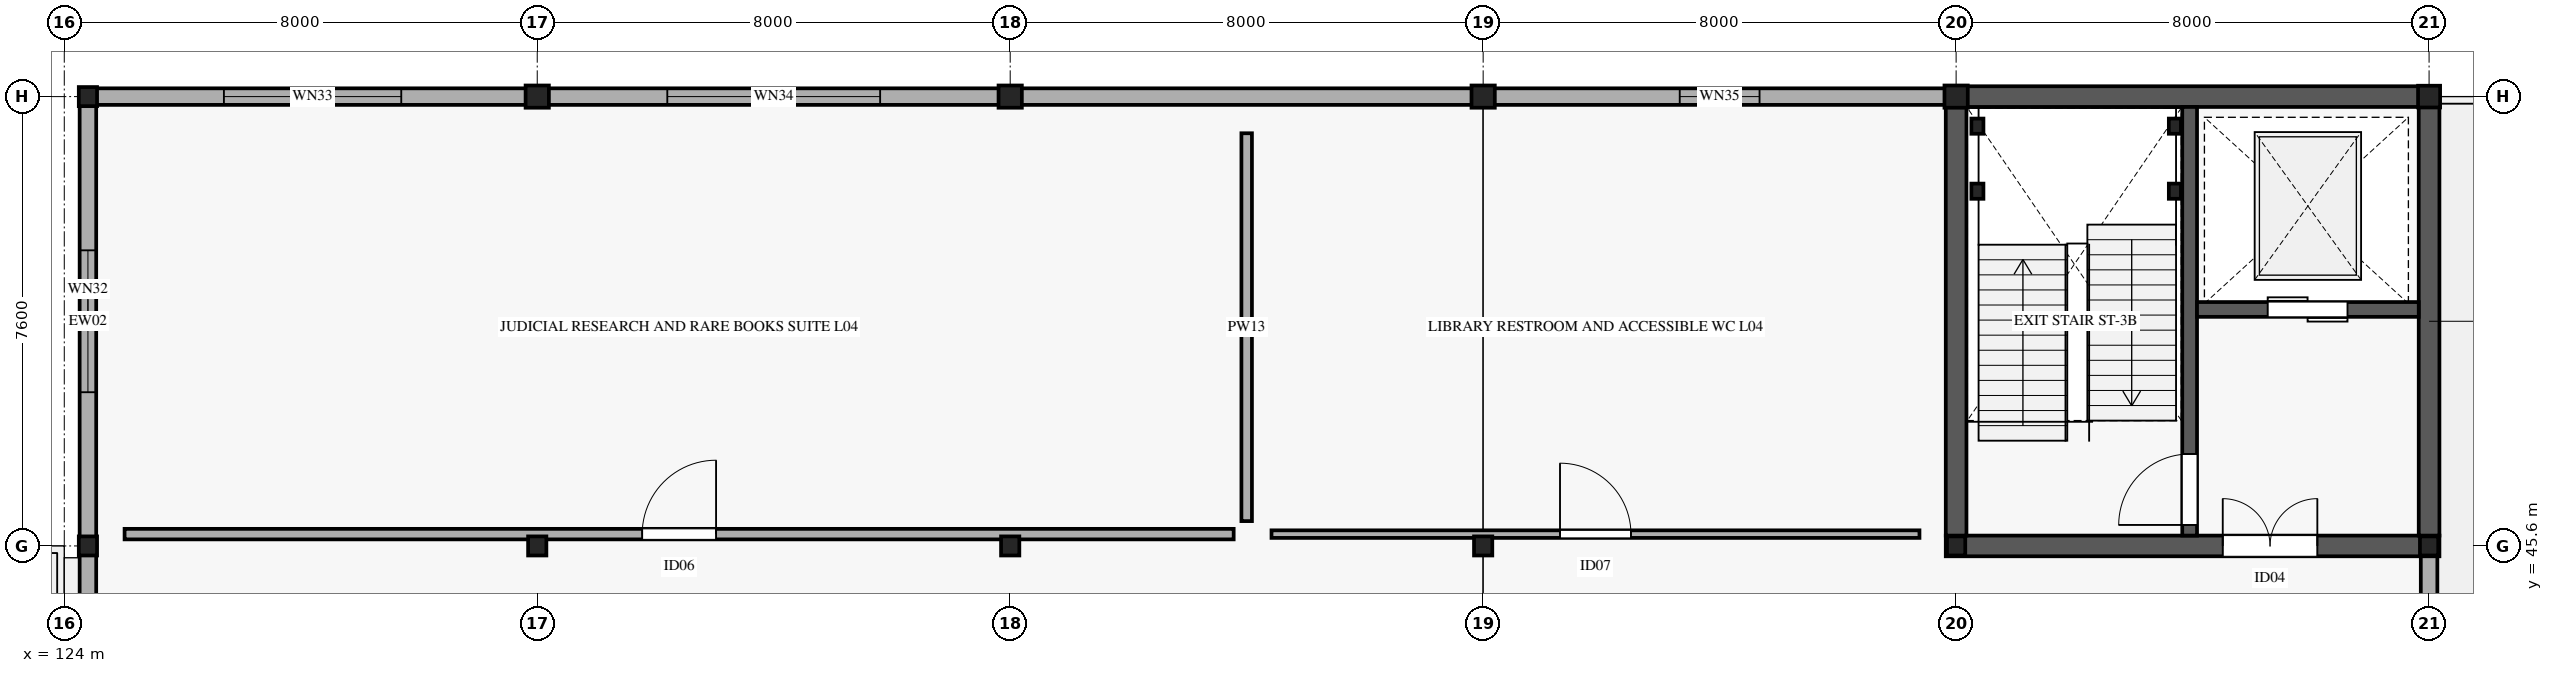
"""IFC4 building model, lengths in metres.
Left out: names, types, materials, properties, quantities, classifications, styles, units other than length and angle.
Written with IfcOpenShell. Run it as: python <this file> out.ifc"""

import sys

from ifc_helpers import new_model, si_unit, direction, frame, frame_2d, origin, origin_2d, place, context, subcontext, project, spatial, rectangle, i_section, extrude, element, fill, save


model = new_model("IFC4")
c1 = context("Model", 3, precision=1e-05, world=origin(), true_north=direction((0.0, 1.0)))
c2 = subcontext(c1, "Body", "Model", "MODEL_VIEW")
j1 = project(units=[si_unit("LENGTHUNIT", "METRE"), si_unit("PLANEANGLEUNIT", "RADIAN")], contexts=[c1])
p1 = place(None, origin())
s1 = spatial("IfcSite", under=j1, at=p1, CompositionType="ELEMENT")
p2 = place(p1, origin())
s2 = spatial("IfcBuilding", under=s1, at=p2, CompositionType="ELEMENT")
p3 = place(p2, frame((0.0, 0.0, 20.4)))
s3 = spatial("IfcBuildingStorey", under=s2, at=p3, CompositionType="ELEMENT", Elevation=20.4)
for number, where, z_axis, x_axis in (
    (1, (124.4, 45.6, 0.0), (0.0, 0.0, 1.0), (1.0, 0.0, 0.0)),
    (2, (124.4, 53.2, 0.0), (0.0, 0.0, 1.0), (1.0, 0.0, 0.0)),
    (3, (132.0, 45.6, 0.0), (0.0, 0.0, 1.0), (1.0, 0.0, 0.0)),
):
    element("IfcColumn", number, at=place(p3, frame(where, z_axis=z_axis, x_axis=x_axis)), inside=s3, PredefinedType="COLUMN", context=c2, shape_type="SweptSolid", body=[
        extrude(i_section(OverallWidth=0.309, OverallDepth=0.323, WebThickness=0.014, FlangeThickness=0.023, FilletRadius=0.015, at=origin_2d()), origin(), (0.0, 0.0, 1.0), 4.545),
    ])
p4 = place(p3, frame((132.0, 53.2, 0.0), z_axis=(0.0, 0.0, 1.0), x_axis=(1.0, 0.0, 0.0)))
e4 = element("IfcColumn", 4, at=p4, inside=s3, PredefinedType="COLUMN", context=c2, shape_type="SweptSolid", body=[
    extrude(i_section(OverallWidth=0.394, OverallDepth=0.376, WebThickness=0.017, FlangeThickness=0.028, FilletRadius=0.015, at=origin_2d()), origin(), (0.0, 0.0, 1.0), 4.545),
])
p5 = place(p3, frame((140.0, 45.6, 0.0), z_axis=(0.0, 0.0, 1.0), x_axis=(1.0, 0.0, 0.0)))
e5 = element("IfcColumn", 5, at=p5, inside=s3, PredefinedType="COLUMN", context=c2, shape_type="SweptSolid", body=[
    extrude(i_section(OverallWidth=0.309, OverallDepth=0.323, WebThickness=0.014, FlangeThickness=0.023, FilletRadius=0.015, at=origin_2d()), origin(), (0.0, 0.0, 1.0), 4.545),
])
p6 = place(p3, frame((140.0, 53.2, 0.0), z_axis=(0.0, 0.0, 1.0), x_axis=(1.0, 0.0, 0.0)))
e6 = element("IfcColumn", 6, at=p6, inside=s3, PredefinedType="COLUMN", context=c2, shape_type="SweptSolid", body=[
    extrude(i_section(OverallWidth=0.394, OverallDepth=0.376, WebThickness=0.017, FlangeThickness=0.028, FilletRadius=0.015, at=origin_2d()), origin(), (0.0, 0.0, 1.0), 4.545),
])
p7 = place(p3, frame((148.0, 45.6, 0.0), z_axis=(0.0, 0.0, 1.0), x_axis=(1.0, 0.0, 0.0)))
e7 = element("IfcColumn", 7, at=p7, inside=s3, PredefinedType="COLUMN", context=c2, shape_type="SweptSolid", body=[
    extrude(i_section(OverallWidth=0.309, OverallDepth=0.323, WebThickness=0.014, FlangeThickness=0.023, FilletRadius=0.015, at=origin_2d()), origin(), (0.0, 0.0, 1.0), 4.545),
])
p8 = place(p3, frame((148.0, 53.2, 0.0), z_axis=(0.0, 0.0, 1.0), x_axis=(1.0, 0.0, 0.0)))
e8 = element("IfcColumn", 8, at=p8, inside=s3, PredefinedType="COLUMN", context=c2, shape_type="SweptSolid", body=[
    extrude(i_section(OverallWidth=0.394, OverallDepth=0.376, WebThickness=0.017, FlangeThickness=0.028, FilletRadius=0.015, at=origin_2d()), origin(), (0.0, 0.0, 1.0), 4.545),
])
p9 = place(p3, frame((156.0, 45.6, 0.0), z_axis=(0.0, 0.0, 1.0), x_axis=(1.0, 0.0, 0.0)))
e9 = element("IfcColumn", 9, at=p9, inside=s3, PredefinedType="COLUMN", context=c2, shape_type="SweptSolid", body=[
    extrude(i_section(OverallWidth=0.309, OverallDepth=0.323, WebThickness=0.014, FlangeThickness=0.023, FilletRadius=0.015, at=origin_2d()), origin(), (0.0, 0.0, 1.0), 4.545),
])
p10 = place(p3, frame((156.0, 53.2, 0.0), z_axis=(0.0, 0.0, 1.0), x_axis=(1.0, 0.0, 0.0)))
e10 = element("IfcColumn", 10, at=p10, inside=s3, PredefinedType="COLUMN", context=c2, shape_type="SweptSolid", body=[
    extrude(i_section(OverallWidth=0.394, OverallDepth=0.376, WebThickness=0.017, FlangeThickness=0.028, FilletRadius=0.015, at=origin_2d()), origin(), (0.0, 0.0, 1.0), 4.545),
])
p11 = place(p3, frame((164.0, 45.6, 0.0), z_axis=(0.0, 0.0, 1.0), x_axis=(1.0, 0.0, 0.0)))
e11 = element("IfcColumn", 11, at=p11, inside=s3, PredefinedType="COLUMN", context=c2, shape_type="SweptSolid", body=[
    extrude(i_section(OverallWidth=0.309, OverallDepth=0.323, WebThickness=0.014, FlangeThickness=0.023, FilletRadius=0.015, at=origin_2d()), origin(), (0.0, 0.0, 1.0), 4.545),
])
p12 = place(p3, frame((164.0, 53.2, 0.0), z_axis=(0.0, 0.0, 1.0), x_axis=(1.0, 0.0, 0.0)))
e12 = element("IfcColumn", 12, at=p12, inside=s3, PredefinedType="COLUMN", context=c2, shape_type="SweptSolid", body=[
    extrude(i_section(OverallWidth=0.373, OverallDepth=0.368, WebThickness=0.015, FlangeThickness=0.024, FilletRadius=0.015, at=origin_2d()), origin(), (0.0, 0.0, 1.0), 4.545),
])
p13 = place(p3, frame((124.4, 37.98, 0.0), z_axis=(0.0, 0.0, 1.0), x_axis=(0.0, 1.0, 0.0)))
e13 = element("IfcWall", 13, at=p13, inside=s3, PredefinedType="STANDARD", context=c2, shape_type="SweptSolid", body=[
    extrude(rectangle(XDim=7.64, YDim=0.28, at=frame_2d((3.82, 0.0))), origin(), (0.0, 0.0, 1.0), 3.605),
])
p14 = place(p13, frame((3.12, 0.0, 0.0)))
e14 = element("IfcOpeningElement", 14, at=p14, cuts=e13, PredefinedType="OPENING", context=c2, shape_type="SweptSolid", body=[
    extrude(rectangle(XDim=1.4, YDim=2.2, at=frame_2d((0.7, 1.1))), frame((0.0, 0.15, 0.0), z_axis=(0.0, -1.0, 0.0), x_axis=(1.0, 0.0, 0.0)), (0.0, 0.0, 1.0), 0.3),
])
p15 = place(p3, frame((124.4, 45.58, 0.0), z_axis=(0.0, 0.0, 1.0), x_axis=(0.0, 1.0, 0.0)))
e15 = element("IfcWall", 15, at=p15, inside=s3, PredefinedType="STANDARD", context=c2, shape_type="SweptSolid", body=[
    extrude(rectangle(XDim=7.64, YDim=0.28, at=frame_2d((3.82, 0.0))), origin(), (0.0, 0.0, 1.0), 3.605),
])
p16 = place(p15, frame((2.62, 0.0, 0.75)))
e16 = element("IfcOpeningElement", 16, at=p16, cuts=e15, PredefinedType="OPENING", context=c2, shape_type="SweptSolid", body=[
    extrude(rectangle(XDim=2.4, YDim=1.3, at=frame_2d((1.2, 0.65))), frame((0.0, 0.15, 0.0), z_axis=(0.0, -1.0, 0.0), x_axis=(1.0, 0.0, 0.0)), (0.0, 0.0, 1.0), 0.3),
])
p17 = place(p3, frame((124.38, 53.2, 0.0), z_axis=(0.0, 0.0, 1.0), x_axis=(1.0, 0.0, 0.0)))
e17 = element("IfcWall", 17, at=p17, inside=s3, PredefinedType="STANDARD", context=c2, shape_type="SweptSolid", body=[
    extrude(rectangle(XDim=7.64, YDim=0.28, at=frame_2d((3.82, 0.0))), origin(), (0.0, 0.0, 1.0), 3.605),
])
p18 = place(p17, frame((2.32, 0.0, 0.75)))
e18 = element("IfcOpeningElement", 18, at=p18, cuts=e17, PredefinedType="OPENING", context=c2, shape_type="SweptSolid", body=[
    extrude(rectangle(XDim=3.0, YDim=1.3, at=frame_2d((1.5, 0.65))), frame((0.0, 0.15, 0.0), z_axis=(0.0, -1.0, 0.0), x_axis=(1.0, 0.0, 0.0)), (0.0, 0.0, 1.0), 0.3),
])
p19 = place(p3, frame((131.98, 53.2, 0.0), z_axis=(0.0, 0.0, 1.0), x_axis=(1.0, 0.0, 0.0)))
e19 = element("IfcWall", 19, at=p19, inside=s3, PredefinedType="STANDARD", context=c2, shape_type="SweptSolid", body=[
    extrude(rectangle(XDim=8.04, YDim=0.28, at=frame_2d((4.02, 0.0))), origin(), (0.0, 0.0, 1.0), 3.605),
])
p20 = place(p19, frame((2.22, 0.0, 0.75)))
e20 = element("IfcOpeningElement", 20, at=p20, cuts=e19, PredefinedType="OPENING", context=c2, shape_type="SweptSolid", body=[
    extrude(rectangle(XDim=3.6, YDim=1.3, at=frame_2d((1.8, 0.65))), frame((0.0, 0.15, 0.0), z_axis=(0.0, -1.0, 0.0), x_axis=(1.0, 0.0, 0.0)), (0.0, 0.0, 1.0), 0.3),
])
p21 = place(p3, frame((139.98, 53.2, 0.0), z_axis=(0.0, 0.0, 1.0), x_axis=(1.0, 0.0, 0.0)))
e21 = element("IfcWall", 21, at=p21, inside=s3, PredefinedType="STANDARD", context=c2, shape_type="SweptSolid", body=[
    extrude(rectangle(XDim=8.04, YDim=0.28, at=frame_2d((4.02, 0.0))), origin(), (0.0, 0.0, 1.0), 3.605),
])
p22 = place(p3, frame((147.98, 53.2, 0.0), z_axis=(0.0, 0.0, 1.0), x_axis=(1.0, 0.0, 0.0)))
e22 = element("IfcWall", 22, at=p22, inside=s3, PredefinedType="STANDARD", context=c2, shape_type="SweptSolid", body=[
    extrude(rectangle(XDim=8.04, YDim=0.28, at=frame_2d((4.02, 0.0))), origin(), (0.0, 0.0, 1.0), 3.605),
])
p23 = place(p22, frame((3.345, 0.0, 0.75)))
e23 = element("IfcOpeningElement", 23, at=p23, cuts=e22, PredefinedType="OPENING", context=c2, shape_type="SweptSolid", body=[
    extrude(rectangle(XDim=1.35, YDim=1.9, at=frame_2d((0.675, 0.95))), frame((0.0, 0.15, 0.0), z_axis=(0.0, -1.0, 0.0), x_axis=(1.0, 0.0, 0.0)), (0.0, 0.0, 1.0), 0.3),
])
p24 = place(p3, frame((164.0, 45.62, 0.0), z_axis=(0.0, 0.0, 1.0), x_axis=(0.0, -1.0, 0.0)))
e24 = element("IfcWall", 24, at=p24, inside=s3, PredefinedType="STANDARD", context=c2, shape_type="SweptSolid", body=[
    extrude(rectangle(XDim=7.64, YDim=0.28, at=frame_2d((3.82, 0.0))), origin(), (0.0, 0.0, 1.0), 3.605),
])
p25 = place(p24, frame((3.045, 0.0, 0.0)))
e25 = element("IfcOpeningElement", 25, at=p25, cuts=e24, PredefinedType="OPENING", context=c2, shape_type="SweptSolid", body=[
    extrude(rectangle(XDim=1.55, YDim=2.25, at=frame_2d((0.775, 1.125))), frame((0.0, 0.15, 0.0), z_axis=(0.0, -1.0, 0.0), x_axis=(1.0, 0.0, 0.0)), (0.0, 0.0, 1.0), 0.3),
])
p26 = place(p3, frame((155.825, 45.6, 0.0), z_axis=(0.0, 0.0, 1.0), x_axis=(1.0, 0.0, 0.0)))
e26 = element("IfcWall", 26, at=p26, inside=s3, PredefinedType="SHEAR", context=c2, shape_type="SweptSolid", body=[
    extrude(rectangle(XDim=8.35, YDim=0.35, at=frame_2d((4.175, 0.0))), origin(), (0.0, 0.0, 1.0), 4.545),
])
p27 = place(p26, frame((4.685, 0.0, 0.0)))
e27 = element("IfcOpeningElement", 27, at=p27, cuts=e26, PredefinedType="OPENING", context=c2, shape_type="SweptSolid", body=[
    extrude(rectangle(XDim=1.6, YDim=2.35, at=frame_2d((0.8, 1.175))), frame((0.0, 0.185, 0.0), z_axis=(0.0, -1.0, 0.0), x_axis=(1.0, 0.0, 0.0)), (0.0, 0.0, 1.0), 0.37),
])
p28 = place(p3, frame((155.825, 53.2, 0.0), z_axis=(0.0, 0.0, 1.0), x_axis=(1.0, 0.0, 0.0)))
e28 = element("IfcWall", 28, at=p28, inside=s3, PredefinedType="SHEAR", context=c2, shape_type="SweptSolid", body=[
    extrude(rectangle(XDim=8.35, YDim=0.35, at=frame_2d((4.175, 0.0))), origin(), (0.0, 0.0, 1.0), 4.545),
])
for number, where, z_axis, x_axis in (
    (29, (156.0, 45.775, 0.0), (0.0, 0.0, 1.0), (0.0, 1.0, 0.0)),
    (30, (164.0, 45.775, 0.0), (0.0, 0.0, 1.0), (0.0, 1.0, 0.0)),
):
    element("IfcWall", number, at=place(p3, frame(where, z_axis=z_axis, x_axis=x_axis)), inside=s3, PredefinedType="SHEAR", context=c2, shape_type="SweptSolid", body=[
        extrude(rectangle(XDim=7.25, YDim=0.35, at=frame_2d((3.625, 0.0))), origin(), (0.0, 0.0, 1.0), 4.545),
    ])
p29 = place(p3, frame((159.95, 45.775, 0.0), z_axis=(0.0, 0.0, 1.0), x_axis=(0.0, 1.0, 0.0)))
e31 = element("IfcWall", 31, at=p29, inside=s3, PredefinedType="SHEAR", context=c2, shape_type="SweptSolid", body=[
    extrude(rectangle(XDim=7.25, YDim=0.25, at=frame_2d((3.625, 0.0))), origin(), (0.0, 0.0, 1.0), 4.545),
])
p30 = place(p29, frame((0.18, 0.0, 0.0)))
e32 = element("IfcOpeningElement", 32, at=p30, cuts=e31, PredefinedType="OPENING", context=c2, shape_type="SweptSolid", body=[
    extrude(rectangle(XDim=1.2, YDim=2.2, at=frame_2d((0.6, 1.1))), frame((0.0, 0.135, 0.0), z_axis=(0.0, -1.0, 0.0), x_axis=(1.0, 0.0, 0.0)), (0.0, 0.0, 1.0), 0.27),
])
p31 = place(p3, frame((160.075, 49.6, 0.0), z_axis=(0.0, 0.0, 1.0), x_axis=(1.0, 0.0, 0.0)))
e33 = element("IfcWall", 33, at=p31, inside=s3, PredefinedType="SHEAR", context=c2, shape_type="SweptSolid", body=[
    extrude(rectangle(XDim=3.75, YDim=0.25, at=frame_2d((1.875, 0.0))), origin(), (0.0, 0.0, 1.0), 4.545),
])
p32 = place(p31, frame((1.195, 0.0, 0.0)))
e34 = element("IfcOpeningElement", 34, at=p32, cuts=e33, PredefinedType="OPENING", context=c2, shape_type="SweptSolid", body=[
    extrude(rectangle(XDim=1.35, YDim=2.2, at=frame_2d((0.675, 1.1))), frame((0.0, 0.135, 0.0), z_axis=(0.0, -1.0, 0.0), x_axis=(1.0, 0.0, 0.0)), (0.0, 0.0, 1.0), 0.27),
])
for number, where, z_axis, x_axis in (
    (35, (156.36, 51.6, 0.0), (0.0, 0.0, 1.0), (1.0, 0.0, 0.0)),
    (36, (159.7, 51.6, 0.0), (0.0, 0.0, 1.0), (1.0, 0.0, 0.0)),
    (37, (156.36, 52.7, 0.0), (0.0, 0.0, 1.0), (1.0, 0.0, 0.0)),
    (38, (159.7, 52.7, 0.0), (0.0, 0.0, 1.0), (1.0, 0.0, 0.0)),
):
    element("IfcColumn", number, at=place(p3, frame(where, z_axis=z_axis, x_axis=x_axis)), inside=s3, PredefinedType="COLUMN", context=c2, shape_type="SweptSolid", body=[
        extrude(i_section(OverallWidth=0.204, OverallDepth=0.257, WebThickness=0.009, FlangeThickness=0.016, FilletRadius=0.013, at=origin_2d()), origin(), (0.0, 0.0, 1.0), 4.795),
    ])
p33 = place(p3, frame((125.02, 45.8, 0.0), z_axis=(0.0, 0.0, 1.0), x_axis=(1.0, 0.0, 0.0)))
e39 = element("IfcWall", 39, at=p33, inside=s3, PredefinedType="PARTITIONING", context=c2, shape_type="SweptSolid", body=[
    extrude(rectangle(XDim=18.76, YDim=0.178, at=frame_2d((9.38, 0.0))), origin(), (0.0, 0.0, 1.0), 3.45),
])
p34 = place(p33, frame((8.755, 0.0, 0.0)))
e40 = element("IfcOpeningElement", 40, at=p34, cuts=e39, PredefinedType="OPENING", context=c2, shape_type="SweptSolid", body=[
    extrude(rectangle(XDim=1.25, YDim=2.2, at=frame_2d((0.625, 1.1))), frame((0.0, 0.099, 0.0), z_axis=(0.0, -1.0, 0.0), x_axis=(1.0, 0.0, 0.0)), (0.0, 0.0, 1.0), 0.198),
])
p35 = place(p3, frame((144.0, 46.02, 0.0), z_axis=(0.0, 0.0, 1.0), x_axis=(0.0, 1.0, 0.0)))
e41 = element("IfcWall", 41, at=p35, inside=s3, PredefinedType="PARTITIONING", context=c2, shape_type="SweptSolid", body=[
    extrude(rectangle(XDim=6.56, YDim=0.178, at=frame_2d((3.28, 0.0))), origin(), (0.0, 0.0, 1.0), 3.45),
])
p36 = place(p3, frame((144.42, 45.8, 0.0), z_axis=(0.0, 0.0, 1.0), x_axis=(1.0, 0.0, 0.0)))
e42 = element("IfcWall", 42, at=p36, inside=s3, PredefinedType="PARTITIONING", context=c2, shape_type="SweptSolid", body=[
    extrude(rectangle(XDim=10.96, YDim=0.128, at=frame_2d((5.48, 0.0))), origin(), (0.0, 0.0, 1.0), 3.45),
])
p37 = place(p36, frame((4.88, 0.0, 0.0)))
e43 = element("IfcOpeningElement", 43, at=p37, cuts=e42, PredefinedType="OPENING", context=c2, shape_type="SweptSolid", body=[
    extrude(rectangle(XDim=1.2, YDim=2.2, at=frame_2d((0.6, 1.1))), frame((0.0, 0.074, 0.0), z_axis=(0.0, -1.0, 0.0), x_axis=(1.0, 0.0, 0.0)), (0.0, 0.0, 1.0), 0.148),
])
p38 = place(p16, origin())
e44 = element("IfcWindow", 44, at=p38, inside=s3, PartitioningType="SINGLE_PANEL", PredefinedType="WINDOW", context=c2, shape_type="SweptSolid", body=[
    extrude(rectangle(XDim=2.4, YDim=1.3, at=frame_2d((1.2, 0.65))), frame((0.0, 0.03, 0.0), z_axis=(0.0, -1.0, 0.0), x_axis=(1.0, 0.0, 0.0)), (0.0, 0.0, 1.0), 0.06),
])
fill(e16, e44)
p39 = place(p18, origin())
e45 = element("IfcWindow", 45, at=p39, inside=s3, PartitioningType="SINGLE_PANEL", PredefinedType="WINDOW", context=c2, shape_type="SweptSolid", body=[
    extrude(rectangle(XDim=3.0, YDim=1.3, at=frame_2d((1.5, 0.65))), frame((0.0, 0.03, 0.0), z_axis=(0.0, -1.0, 0.0), x_axis=(1.0, 0.0, 0.0)), (0.0, 0.0, 1.0), 0.06),
])
fill(e18, e45)
p40 = place(p20, origin())
e46 = element("IfcWindow", 46, at=p40, inside=s3, PartitioningType="SINGLE_PANEL", PredefinedType="WINDOW", context=c2, shape_type="SweptSolid", body=[
    extrude(rectangle(XDim=3.6, YDim=1.3, at=frame_2d((1.8, 0.65))), frame((0.0, 0.03, 0.0), z_axis=(0.0, -1.0, 0.0), x_axis=(1.0, 0.0, 0.0)), (0.0, 0.0, 1.0), 0.06),
])
fill(e20, e46)
p41 = place(p23, origin())
e47 = element("IfcWindow", 47, at=p41, inside=s3, PartitioningType="SINGLE_PANEL", PredefinedType="WINDOW", context=c2, shape_type="SweptSolid", body=[
    extrude(rectangle(XDim=1.35, YDim=1.9, at=frame_2d((0.675, 0.95))), frame((0.0, 0.03, 0.0), z_axis=(0.0, -1.0, 0.0), x_axis=(1.0, 0.0, 0.0)), (0.0, 0.0, 1.0), 0.06),
])
fill(e23, e47)
p42 = place(p30, origin())
e48 = element("IfcDoor", 48, at=p42, inside=s3, OperationType="SINGLE_SWING_LEFT", PredefinedType="DOOR", context=c2, shape_type="SweptSolid", body=[
    extrude(rectangle(XDim=1.2, YDim=2.2, at=frame_2d((0.6, 1.1))), frame((0.0, 0.025, 0.0), z_axis=(0.0, -1.0, 0.0), x_axis=(1.0, 0.0, 0.0)), (0.0, 0.0, 1.0), 0.05),
])
fill(e32, e48)
p43 = place(p27, origin())
e49 = element("IfcDoor", 49, at=p43, inside=s3, OperationType="DOUBLE_DOOR_SINGLE_SWING", PredefinedType="DOOR", context=c2, shape_type="SweptSolid", body=[
    extrude(rectangle(XDim=1.6, YDim=2.35, at=frame_2d((0.8, 1.175))), frame((0.0, 0.025, 0.0), z_axis=(0.0, -1.0, 0.0), x_axis=(1.0, 0.0, 0.0)), (0.0, 0.0, 1.0), 0.05),
])
fill(e27, e49)
p44 = place(p32, origin())
e50 = element("IfcDoor", 50, at=p44, inside=s3, OperationType="DOUBLE_DOOR_SLIDING", PredefinedType="DOOR", context=c2, shape_type="SweptSolid", body=[
    extrude(rectangle(XDim=1.35, YDim=2.2, at=frame_2d((0.675, 1.1))), frame((0.0, 0.025, 0.0), z_axis=(0.0, -1.0, 0.0), x_axis=(1.0, 0.0, 0.0)), (0.0, 0.0, 1.0), 0.05),
])
fill(e34, e50)
p45 = place(p34, origin())
e51 = element("IfcDoor", 51, at=p45, inside=s3, OperationType="SINGLE_SWING_RIGHT", PredefinedType="DOOR", context=c2, shape_type="SweptSolid", body=[
    extrude(rectangle(XDim=1.25, YDim=2.2, at=frame_2d((0.625, 1.1))), frame((0.0, 0.025, 0.0), z_axis=(0.0, -1.0, 0.0), x_axis=(1.0, 0.0, 0.0)), (0.0, 0.0, 1.0), 0.05),
])
fill(e40, e51)
p46 = place(p37, origin())
e52 = element("IfcDoor", 52, at=p46, inside=s3, OperationType="SINGLE_SWING_LEFT", PredefinedType="DOOR", context=c2, shape_type="SweptSolid", body=[
    extrude(rectangle(XDim=1.2, YDim=2.2, at=frame_2d((0.6, 1.1))), frame((0.0, 0.025, 0.0), z_axis=(0.0, -1.0, 0.0), x_axis=(1.0, 0.0, 0.0)), (0.0, 0.0, 1.0), 0.05),
])
fill(e43, e52)
save(model, sys.argv[1])
